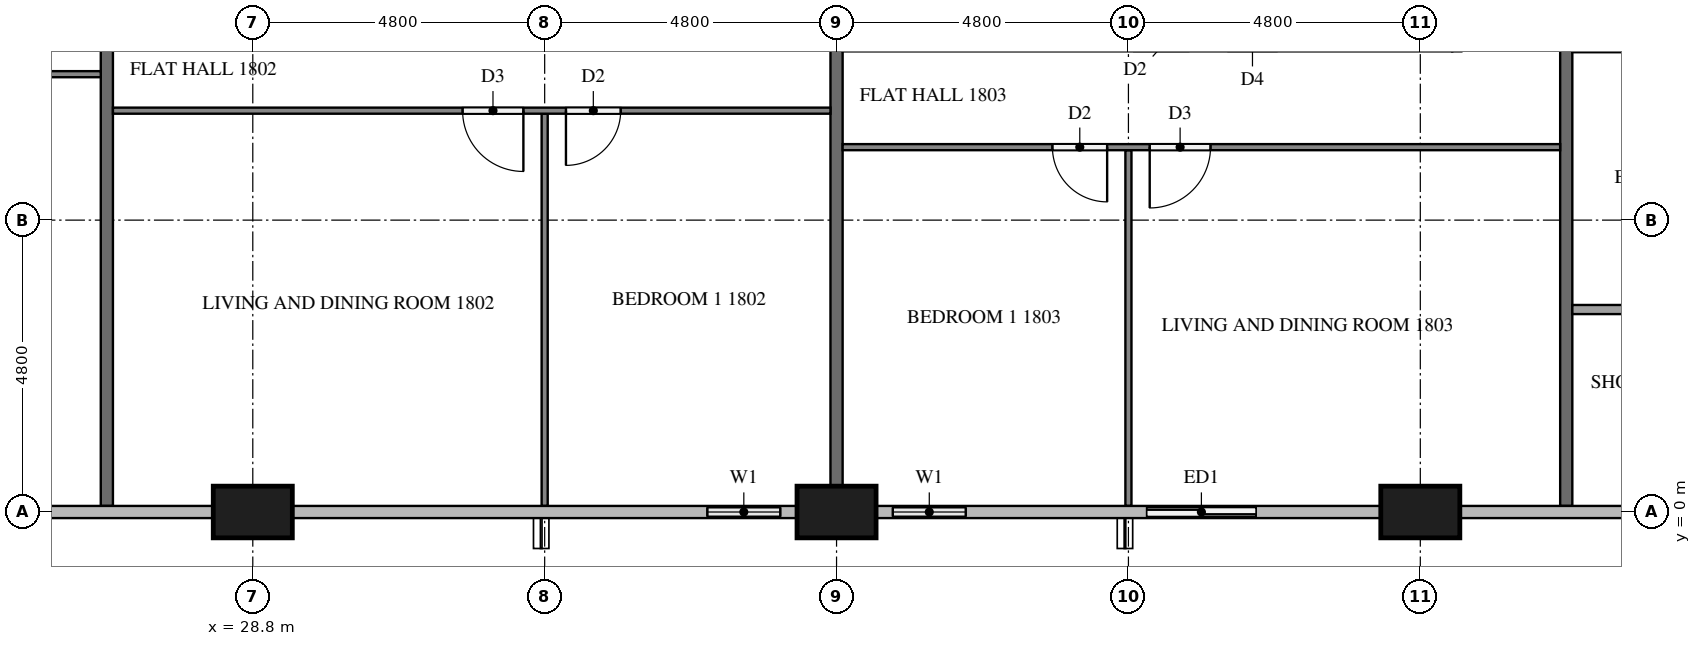
"""IFC4 building model, lengths in metres.
Left out: names, types, materials, properties, quantities, classifications, styles, units other than length and angle.
Written with IfcOpenShell. Run it as: python <this file> out.ifc"""

import sys

from ifc_helpers import new_model, si_unit, direction, frame, frame_2d, origin, origin_2d, place, context, subcontext, project, spatial, rectangle, extrude, element, fill, save


model = new_model("IFC4")
c1 = context("Model", 3, precision=1e-05, world=origin(), true_north=direction((0.0, 1.0)))
c2 = subcontext(c1, "Body", "Model", "MODEL_VIEW")
j1 = project(units=[si_unit("LENGTHUNIT", "METRE"), si_unit("PLANEANGLEUNIT", "RADIAN")], contexts=[c1])
p1 = place(None, origin())
s1 = spatial("IfcSite", under=j1, at=p1, CompositionType="ELEMENT")
p2 = place(p1, origin())
s2 = spatial("IfcBuilding", under=s1, at=p2, CompositionType="ELEMENT")
p3 = place(p2, frame((0.0, 0.0, 73.3)))
s3 = spatial("IfcBuildingStorey", under=s2, at=p3, CompositionType="ELEMENT", Elevation=73.3)
for number, where, z_axis, x_axis in (
    (1, (28.8, 0.0, 0.0), (0.0, 0.0, 1.0), (1.0, 0.0, 0.0)),
    (2, (38.4, 0.0, 0.0), (0.0, 0.0, 1.0), (1.0, 0.0, 0.0)),
    (3, (48.0, 0.0, 0.0), (0.0, 0.0, 1.0), (1.0, 0.0, 0.0)),
):
    element("IfcColumn", number, at=place(p3, frame(where, z_axis=z_axis, x_axis=x_axis)), inside=s3, PredefinedType="COLUMN", context=c2, shape_type="SweptSolid", body=[
        extrude(rectangle(XDim=1.3, YDim=0.85, at=origin_2d()), origin(), (0.0, 0.0, 1.0), 3.2),
    ])
p4 = place(p3, frame((36.0, 0.0, 0.0), z_axis=(0.0, 0.0, 1.0), x_axis=(1.0, 0.0, 0.0)))
e4 = element("IfcWall", 4, at=p4, inside=s3, PredefinedType="SOLIDWALL", context=c2, shape_type="SweptSolid", body=[
    extrude(rectangle(XDim=1.75, YDim=0.15, at=frame_2d((0.875, 0.0))), origin(), (0.0, 0.0, 1.0), 3.2),
])
p5 = place(p4, frame((0.275, 0.0, 0.9)))
e5 = element("IfcOpeningElement", 5, at=p5, cuts=e4, PredefinedType="OPENING", context=c2, shape_type="SweptSolid", body=[
    extrude(rectangle(XDim=1.2, YDim=1.4, at=frame_2d((0.6, 0.7))), frame((0.0, 0.085, 0.0), z_axis=(0.0, -1.0, 0.0), x_axis=(1.0, 0.0, 0.0)), (0.0, 0.0, 1.0), 0.17),
])
p6 = place(p3, frame((39.05, 0.0, 0.0), z_axis=(0.0, 0.0, 1.0), x_axis=(1.0, 0.0, 0.0)))
e6 = element("IfcWall", 6, at=p6, inside=s3, PredefinedType="SOLIDWALL", context=c2, shape_type="SweptSolid", body=[
    extrude(rectangle(XDim=1.75, YDim=0.15, at=frame_2d((0.875, 0.0))), origin(), (0.0, 0.0, 1.0), 3.2),
])
p7 = place(p6, frame((0.275, 0.0, 0.9)))
e7 = element("IfcOpeningElement", 7, at=p7, cuts=e6, PredefinedType="OPENING", context=c2, shape_type="SweptSolid", body=[
    extrude(rectangle(XDim=1.2, YDim=1.4, at=frame_2d((0.6, 0.7))), frame((0.0, 0.085, 0.0), z_axis=(0.0, -1.0, 0.0), x_axis=(1.0, 0.0, 0.0)), (0.0, 0.0, 1.0), 0.17),
])
p8 = place(p3, frame((43.2, 0.0, 0.0), z_axis=(0.0, 0.0, 1.0), x_axis=(1.0, 0.0, 0.0)))
e8 = element("IfcWall", 8, at=p8, inside=s3, PredefinedType="SOLIDWALL", context=c2, shape_type="SweptSolid", body=[
    extrude(rectangle(XDim=2.4, YDim=0.15, at=frame_2d((1.2, 0.0))), origin(), (0.0, 0.0, 1.0), 3.2),
])
p9 = place(p8, frame((0.3, 0.0, 0.0)))
e9 = element("IfcOpeningElement", 9, at=p9, cuts=e8, PredefinedType="OPENING", context=c2, shape_type="SweptSolid", body=[
    extrude(rectangle(XDim=1.8, YDim=2.4, at=frame_2d((0.9, 1.2))), frame((0.0, 0.085, 0.0), z_axis=(0.0, -1.0, 0.0), x_axis=(1.0, 0.0, 0.0)), (0.0, 0.0, 1.0), 0.17),
])
p10 = place(p3, frame((26.4, 11.9, 0.0), z_axis=(0.0, 0.0, 1.0), x_axis=(0.0, -1.0, 0.0)))
e10 = element("IfcWall", 10, at=p10, inside=s3, PredefinedType="PARTITIONING", context=c2, shape_type="SweptSolid", body=[
    extrude(rectangle(XDim=11.8, YDim=0.2, at=frame_2d((5.9, 0.0))), origin(), (0.0, 0.0, 1.0), 3.2),
])
p11 = place(p3, frame((38.4, 11.9, 0.0), z_axis=(0.0, 0.0, 1.0), x_axis=(0.0, -1.0, 0.0)))
e11 = element("IfcWall", 11, at=p11, inside=s3, PredefinedType="PARTITIONING", context=c2, shape_type="SweptSolid", body=[
    extrude(rectangle(XDim=11.475, YDim=0.2, at=frame_2d((5.737, 0.0))), origin(), (0.0, 0.0, 1.0), 3.2),
])
p12 = place(p3, frame((50.4, 11.9, 0.0), z_axis=(0.0, 0.0, 1.0), x_axis=(0.0, -1.0, 0.0)))
e12 = element("IfcWall", 12, at=p12, inside=s3, PredefinedType="PARTITIONING", context=c2, shape_type="SweptSolid", body=[
    extrude(rectangle(XDim=11.8, YDim=0.2, at=frame_2d((5.9, 0.0))), origin(), (0.0, 0.0, 1.0), 3.2),
])
p13 = place(p3, frame((26.3, 7.2, 0.0), z_axis=(0.0, 0.0, 1.0), x_axis=(-1.0, 0.0, 0.0)))
e13 = element("IfcWall", 13, at=p13, inside=s3, PredefinedType="PARTITIONING", context=c2, shape_type="SweptSolid", body=[
    extrude(rectangle(XDim=14.2, YDim=0.1, at=frame_2d((7.1, 0.0))), origin(), (0.0, 0.0, 1.0), 3.2),
])
p14 = place(p13, frame((12.9, 0.0, 0.0)))
e14 = element("IfcOpeningElement", 14, at=p14, cuts=e13, PredefinedType="OPENING", context=c2, shape_type="SweptSolid", body=[
    extrude(rectangle(XDim=1.0, YDim=2.1, at=frame_2d((0.5, 1.05))), frame((0.0, 0.06, 0.0), z_axis=(0.0, -1.0, 0.0), x_axis=(1.0, 0.0, 0.0)), (0.0, 0.0, 1.0), 0.12),
])
p15 = place(p13, frame((5.05, 0.0, 0.0)))
e15 = element("IfcOpeningElement", 15, at=p15, cuts=e13, PredefinedType="OPENING", context=c2, shape_type="SweptSolid", body=[
    extrude(rectangle(XDim=0.9, YDim=2.1, at=frame_2d((0.45, 1.05))), frame((0.0, 0.06, 0.0), z_axis=(0.0, -1.0, 0.0), x_axis=(1.0, 0.0, 0.0)), (0.0, 0.0, 1.0), 0.12),
])
p16 = place(p13, frame((3.45, 0.0, 0.0)))
e16 = element("IfcOpeningElement", 16, at=p16, cuts=e13, PredefinedType="OPENING", context=c2, shape_type="SweptSolid", body=[
    extrude(rectangle(XDim=0.9, YDim=2.1, at=frame_2d((0.45, 1.05))), frame((0.0, 0.06, 0.0), z_axis=(0.0, -1.0, 0.0), x_axis=(1.0, 0.0, 0.0)), (0.0, 0.0, 1.0), 0.12),
])
p17 = place(p3, frame((33.6, 6.55, 0.0), z_axis=(0.0, 0.0, 1.0), x_axis=(0.0, -1.0, 0.0)))
e17 = element("IfcWall", 17, at=p17, inside=s3, PredefinedType="PARTITIONING", context=c2, shape_type="SweptSolid", body=[
    extrude(rectangle(XDim=6.45, YDim=0.1, at=frame_2d((3.225, 0.0))), origin(), (0.0, 0.0, 1.0), 3.2),
])
p18 = place(p3, frame((38.3, 6.6, 0.0), z_axis=(0.0, 0.0, 1.0), x_axis=(-1.0, 0.0, 0.0)))
e18 = element("IfcWall", 18, at=p18, inside=s3, PredefinedType="PARTITIONING", context=c2, shape_type="SweptSolid", body=[
    extrude(rectangle(XDim=11.8, YDim=0.1, at=frame_2d((5.9, 0.0))), origin(), (0.0, 0.0, 1.0), 3.2),
])
p19 = place(p18, frame((5.05, 0.0, 0.0)))
e19 = element("IfcOpeningElement", 19, at=p19, cuts=e18, PredefinedType="OPENING", context=c2, shape_type="SweptSolid", body=[
    extrude(rectangle(XDim=1.0, YDim=2.1, at=frame_2d((0.5, 1.05))), frame((0.0, 0.06, 0.0), z_axis=(0.0, -1.0, 0.0), x_axis=(1.0, 0.0, 0.0)), (0.0, 0.0, 1.0), 0.12),
])
p20 = place(p18, frame((3.45, 0.0, 0.0)))
e20 = element("IfcOpeningElement", 20, at=p20, cuts=e18, PredefinedType="OPENING", context=c2, shape_type="SweptSolid", body=[
    extrude(rectangle(XDim=0.9, YDim=2.1, at=frame_2d((0.45, 1.05))), frame((0.0, 0.06, 0.0), z_axis=(0.0, -1.0, 0.0), x_axis=(1.0, 0.0, 0.0)), (0.0, 0.0, 1.0), 0.12),
])
p21 = place(p3, frame((43.2, 5.95, 0.0), z_axis=(0.0, 0.0, 1.0), x_axis=(0.0, -1.0, 0.0)))
e21 = element("IfcWall", 21, at=p21, inside=s3, PredefinedType="PARTITIONING", context=c2, shape_type="SweptSolid", body=[
    extrude(rectangle(XDim=5.85, YDim=0.1, at=frame_2d((2.925, 0.0))), origin(), (0.0, 0.0, 1.0), 3.2),
])
p22 = place(p3, frame((50.3, 6.0, 0.0), z_axis=(0.0, 0.0, 1.0), x_axis=(-1.0, 0.0, 0.0)))
e22 = element("IfcWall", 22, at=p22, inside=s3, PredefinedType="PARTITIONING", context=c2, shape_type="SweptSolid", body=[
    extrude(rectangle(XDim=11.8, YDim=0.1, at=frame_2d((5.9, 0.0))), origin(), (0.0, 0.0, 1.0), 3.2),
])
p23 = place(p22, frame((5.75, 0.0, 0.0)))
e23 = element("IfcOpeningElement", 23, at=p23, cuts=e22, PredefinedType="OPENING", context=c2, shape_type="SweptSolid", body=[
    extrude(rectangle(XDim=1.0, YDim=2.1, at=frame_2d((0.5, 1.05))), frame((0.0, 0.06, 0.0), z_axis=(0.0, -1.0, 0.0), x_axis=(1.0, 0.0, 0.0)), (0.0, 0.0, 1.0), 0.12),
])
p24 = place(p22, frame((7.45, 0.0, 0.0)))
e24 = element("IfcOpeningElement", 24, at=p24, cuts=e22, PredefinedType="OPENING", context=c2, shape_type="SweptSolid", body=[
    extrude(rectangle(XDim=0.9, YDim=2.1, at=frame_2d((0.45, 1.05))), frame((0.0, 0.06, 0.0), z_axis=(0.0, -1.0, 0.0), x_axis=(1.0, 0.0, 0.0)), (0.0, 0.0, 1.0), 0.12),
])
p25 = place(p3, frame((50.5, 3.33, 0.0), z_axis=(0.0, 0.0, 1.0), x_axis=(1.0, 0.0, 0.0)))
e25 = element("IfcWall", 25, at=p25, inside=s3, PredefinedType="PARTITIONING", context=c2, shape_type="SweptSolid", body=[
    extrude(rectangle(XDim=3.875, YDim=0.15, at=frame_2d((1.938, 0.0))), origin(), (0.0, 0.0, 1.0), 3.2),
])
p26 = place(p5, origin())
e26 = element("IfcWindow", 26, at=p26, inside=s3, PartitioningType="SINGLE_PANEL", PredefinedType="WINDOW", context=c2, shape_type="SweptSolid", body=[
    extrude(rectangle(XDim=1.2, YDim=1.4, at=frame_2d((0.6, 0.7))), frame((0.0, 0.03, 0.0), z_axis=(0.0, -1.0, 0.0), x_axis=(1.0, 0.0, 0.0)), (0.0, 0.0, 1.0), 0.06),
])
fill(e5, e26)
p27 = place(p7, origin())
e27 = element("IfcWindow", 27, at=p27, inside=s3, PartitioningType="SINGLE_PANEL", PredefinedType="WINDOW", context=c2, shape_type="SweptSolid", body=[
    extrude(rectangle(XDim=1.2, YDim=1.4, at=frame_2d((0.6, 0.7))), frame((0.0, 0.03, 0.0), z_axis=(0.0, -1.0, 0.0), x_axis=(1.0, 0.0, 0.0)), (0.0, 0.0, 1.0), 0.06),
])
fill(e7, e27)
p28 = place(p9, origin())
e28 = element("IfcDoor", 28, at=p28, inside=s3, OperationType="SLIDING_TO_RIGHT", PredefinedType="DOOR", context=c2, shape_type="SweptSolid", body=[
    extrude(rectangle(XDim=1.8, YDim=2.4, at=frame_2d((0.9, 1.2))), frame((0.0, 0.025, 0.0), z_axis=(0.0, -1.0, 0.0), x_axis=(1.0, 0.0, 0.0)), (0.0, 0.0, 1.0), 0.05),
])
fill(e9, e28)
p29 = place(p19, origin())
e29 = element("IfcDoor", 29, at=p29, inside=s3, OperationType="SINGLE_SWING_LEFT", PredefinedType="DOOR", context=c2, shape_type="SweptSolid", body=[
    extrude(rectangle(XDim=1.0, YDim=2.1, at=frame_2d((0.5, 1.05))), frame((0.0, 0.025, 0.0), z_axis=(0.0, -1.0, 0.0), x_axis=(1.0, 0.0, 0.0)), (0.0, 0.0, 1.0), 0.05),
])
fill(e19, e29)
p30 = place(p20, origin())
e30 = element("IfcDoor", 30, at=p30, inside=s3, OperationType="SINGLE_SWING_RIGHT", PredefinedType="DOOR", context=c2, shape_type="SweptSolid", body=[
    extrude(rectangle(XDim=0.9, YDim=2.1, at=frame_2d((0.45, 1.05))), frame((0.0, 0.025, 0.0), z_axis=(0.0, -1.0, 0.0), x_axis=(1.0, 0.0, 0.0)), (0.0, 0.0, 1.0), 0.05),
])
fill(e20, e30)
p31 = place(p23, origin())
e31 = element("IfcDoor", 31, at=p31, inside=s3, OperationType="SINGLE_SWING_RIGHT", PredefinedType="DOOR", context=c2, shape_type="SweptSolid", body=[
    extrude(rectangle(XDim=1.0, YDim=2.1, at=frame_2d((0.5, 1.05))), frame((0.0, 0.025, 0.0), z_axis=(0.0, -1.0, 0.0), x_axis=(1.0, 0.0, 0.0)), (0.0, 0.0, 1.0), 0.05),
])
fill(e23, e31)
p32 = place(p24, origin())
e32 = element("IfcDoor", 32, at=p32, inside=s3, OperationType="SINGLE_SWING_LEFT", PredefinedType="DOOR", context=c2, shape_type="SweptSolid", body=[
    extrude(rectangle(XDim=0.9, YDim=2.1, at=frame_2d((0.45, 1.05))), frame((0.0, 0.025, 0.0), z_axis=(0.0, -1.0, 0.0), x_axis=(1.0, 0.0, 0.0)), (0.0, 0.0, 1.0), 0.05),
])
fill(e24, e32)
save(model, sys.argv[1])
